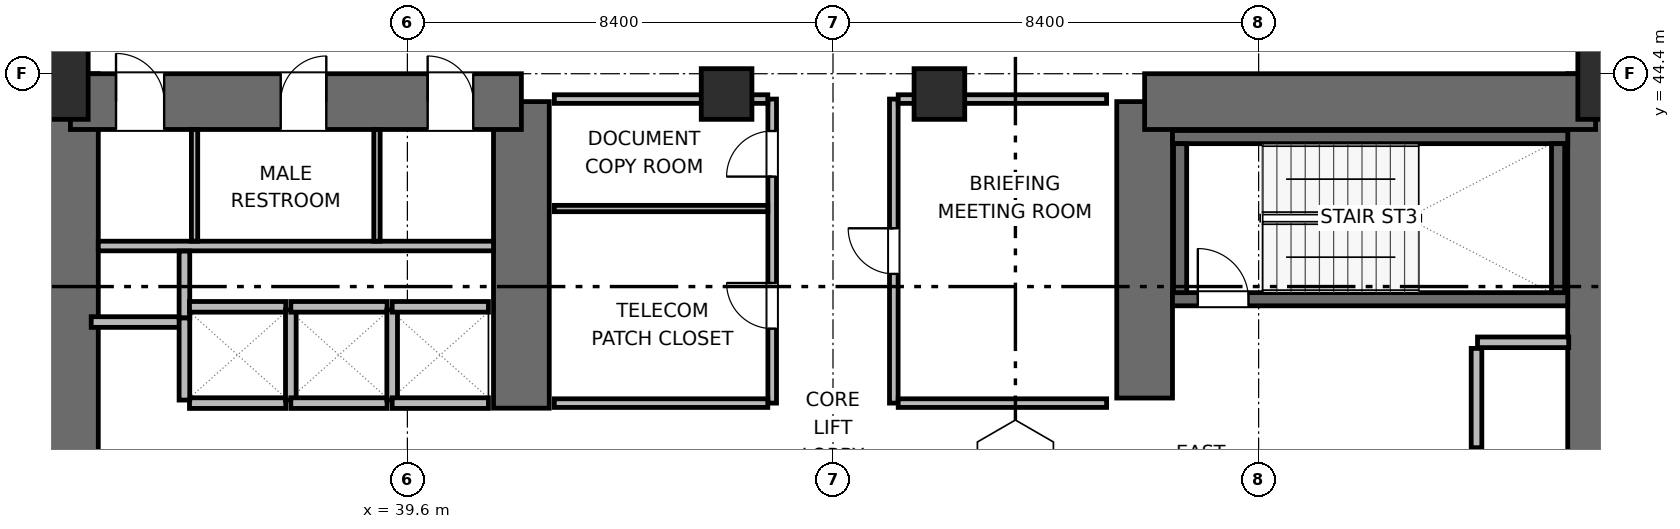
"""IFC4 building model, lengths in metres.
Left out: names, types, materials, properties, quantities, classifications, styles, units other than length and angle.
Written with IfcOpenShell. Run it as: python <this file> out.ifc"""

import sys

from ifc_helpers import new_model, si_unit, direction, frame, frame_2d, origin, origin_2d, place, context, subcontext, project, spatial, rectangle, extrude, element, fill, save


model = new_model("IFC4")
c1 = context("Model", 3, precision=1e-05, world=origin(), true_north=direction((0.0, 1.0)))
c2 = subcontext(c1, "Body", "Model", "MODEL_VIEW")
j1 = project(units=[si_unit("LENGTHUNIT", "METRE"), si_unit("PLANEANGLEUNIT", "RADIAN")], contexts=[c1])
p1 = place(None, origin())
s1 = spatial("IfcSite", under=j1, at=p1, CompositionType="ELEMENT")
p2 = place(p1, origin())
s2 = spatial("IfcBuilding", under=s1, at=p2, CompositionType="ELEMENT")
p3 = place(p2, frame((0.0, 0.0, 8.7)))
s3 = spatial("IfcBuildingStorey", under=s2, at=p3, CompositionType="ELEMENT", Elevation=8.7)
p4 = place(p3, frame((32.95, 27.6, 0.0), z_axis=(0.0, 0.0, 1.0), x_axis=(0.0, 1.0, 0.0)))
e1 = element("IfcWall", 1, at=p4, inside=s3, PredefinedType="SHEAR", context=c2, shape_type="SweptSolid", body=[
    extrude(rectangle(XDim=16.8, YDim=1.1, at=frame_2d((8.4, 0.0))), origin(), (0.0, 0.0, 1.0), 4.2),
])
p5 = place(p3, frame((41.85, 37.8, 0.0), z_axis=(0.0, 0.0, 1.0), x_axis=(0.0, 1.0, 0.0)))
e2 = element("IfcWall", 2, at=p5, inside=s3, PredefinedType="SHEAR", context=c2, shape_type="SweptSolid", body=[
    extrude(rectangle(XDim=6.05, YDim=1.1, at=frame_2d((3.025, 0.0))), origin(), (0.0, 0.0, 1.0), 4.2),
])
p6 = place(p3, frame((32.95, 43.85, 0.0), z_axis=(0.0, 0.0, 1.0), x_axis=(1.0, 0.0, 0.0)))
e3 = element("IfcWall", 3, at=p6, inside=s3, PredefinedType="SHEAR", context=c2, shape_type="SweptSolid", body=[
    extrude(rectangle(XDim=8.9, YDim=1.1, at=frame_2d((4.45, 0.0))), origin(), (0.0, 0.0, 1.0), 4.2),
])
p7 = place(p6, frame((0.9, 0.0, 0.0)))
e4 = element("IfcOpeningElement", 4, at=p7, cuts=e3, PredefinedType="OPENING", context=c2, shape_type="SweptSolid", body=[
    extrude(rectangle(XDim=0.95, YDim=2.04, at=frame_2d((0.475, 1.02))), frame((0.0, 0.56, 0.0), z_axis=(0.0, -1.0, 0.0), x_axis=(1.0, 0.0, 0.0)), (0.0, 0.0, 1.0), 1.12),
])
p8 = place(p6, frame((4.15, 0.0, 0.0)))
e5 = element("IfcOpeningElement", 5, at=p8, cuts=e3, PredefinedType="OPENING", context=c2, shape_type="SweptSolid", body=[
    extrude(rectangle(XDim=0.9, YDim=2.02, at=frame_2d((0.45, 1.01))), frame((0.0, 0.56, 0.0), z_axis=(0.0, -1.0, 0.0), x_axis=(1.0, 0.0, 0.0)), (0.0, 0.0, 1.0), 1.12),
])
p9 = place(p6, frame((7.05, 0.0, 0.0)))
e6 = element("IfcOpeningElement", 6, at=p9, cuts=e3, PredefinedType="OPENING", context=c2, shape_type="SweptSolid", body=[
    extrude(rectangle(XDim=0.9, YDim=2.02, at=frame_2d((0.45, 1.01))), frame((0.0, 0.56, 0.0), z_axis=(0.0, -1.0, 0.0), x_axis=(1.0, 0.0, 0.0)), (0.0, 0.0, 1.0), 1.12),
])
p10 = place(p3, frame((54.15, 38.0, 0.0), z_axis=(0.0, 0.0, 1.0), x_axis=(0.0, 1.0, 0.0)))
e7 = element("IfcWall", 7, at=p10, inside=s3, PredefinedType="SHEAR", context=c2, shape_type="SweptSolid", body=[
    extrude(rectangle(XDim=5.85, YDim=1.1, at=frame_2d((2.925, 0.0))), origin(), (0.0, 0.0, 1.0), 4.2),
])
p11 = place(p3, frame((63.05, 27.6, 0.0), z_axis=(0.0, 0.0, 1.0), x_axis=(0.0, 1.0, 0.0)))
e8 = element("IfcWall", 8, at=p11, inside=s3, PredefinedType="SHEAR", context=c2, shape_type="SweptSolid", body=[
    extrude(rectangle(XDim=16.8, YDim=1.1, at=frame_2d((8.4, 0.0))), origin(), (0.0, 0.0, 1.0), 4.2),
])
p12 = place(p3, frame((54.15, 43.85, 0.0), z_axis=(0.0, 0.0, 1.0), x_axis=(1.0, 0.0, 0.0)))
e9 = element("IfcWall", 9, at=p12, inside=s3, PredefinedType="SHEAR", context=c2, shape_type="SweptSolid", body=[
    extrude(rectangle(XDim=8.9, YDim=1.1, at=frame_2d((4.45, 0.0))), origin(), (0.0, 0.0, 1.0), 4.2),
])
p13 = place(p3, frame((54.7, 39.95, 0.0), z_axis=(0.0, 0.0, 1.0), x_axis=(1.0, 0.0, 0.0)))
e10 = element("IfcWall", 10, at=p13, inside=s3, PredefinedType="SHEAR", context=c2, shape_type="SweptSolid", body=[
    extrude(rectangle(XDim=7.8, YDim=0.26, at=frame_2d((3.9, 0.0))), origin(), (0.0, 0.0, 1.0), 4.2),
])
p14 = place(p13, frame((0.5, 0.0, 0.0)))
e11 = element("IfcOpeningElement", 11, at=p14, cuts=e10, PredefinedType="OPENING", context=c2, shape_type="SweptSolid", body=[
    extrude(rectangle(XDim=1.0, YDim=2.04, at=frame_2d((0.5, 1.02))), frame((0.0, 0.14, 0.0), z_axis=(0.0, -1.0, 0.0), x_axis=(1.0, 0.0, 0.0)), (0.0, 0.0, 1.0), 0.28),
])
p15 = place(p3, frame((54.7, 43.15, 0.0), z_axis=(0.0, 0.0, 1.0), x_axis=(1.0, 0.0, 0.0)))
e12 = element("IfcWall", 12, at=p15, inside=s3, PredefinedType="SHEAR", context=c2, shape_type="SweptSolid", body=[
    extrude(rectangle(XDim=7.8, YDim=0.26, at=frame_2d((3.9, 0.0))), origin(), (0.0, 0.0, 1.0), 4.2),
])
for number, where, z_axis, x_axis in (
    (13, (54.85, 40.08, 0.0), (0.0, 0.0, 1.0), (0.0, 1.0, 0.0)),
    (14, (62.31, 40.08, 0.0), (0.0, 0.0, 1.0), (0.0, 1.0, 0.0)),
):
    element("IfcWall", number, at=place(p3, frame(where, z_axis=z_axis, x_axis=x_axis)), inside=s3, PredefinedType="SHEAR", context=c2, shape_type="SweptSolid", body=[
        extrude(rectangle(XDim=2.94, YDim=0.26, at=frame_2d((1.47, 0.0))), origin(), (0.0, 0.0, 1.0), 4.2),
    ])
for number, where, z_axis, x_axis in (
    (15, (32.4, 44.4, 0.0), (0.0, 0.0, 1.0), (1.0, 0.0, 0.0)),
    (16, (63.6, 44.4, 0.0), (0.0, 0.0, 1.0), (1.0, 0.0, 0.0)),
):
    element("IfcColumn", number, at=place(p3, frame(where, z_axis=z_axis, x_axis=x_axis)), inside=s3, PredefinedType="COLUMN", context=c2, shape_type="SweptSolid", body=[
        extrude(rectangle(XDim=1.8, YDim=1.8, at=origin_2d()), origin(), (0.0, 0.0, 1.0), 4.2),
    ])
for number, where, z_axis, x_axis in (
    (17, (45.9, 44.0, 0.0), (0.0, 0.0, 1.0), (1.0, 0.0, 0.0)),
    (18, (50.1, 44.0, 0.0), (0.0, 0.0, 1.0), (1.0, 0.0, 0.0)),
):
    element("IfcColumn", number, at=place(p3, frame(where, z_axis=z_axis, x_axis=x_axis)), inside=s3, PredefinedType="COLUMN", context=c2, shape_type="SweptSolid", body=[
        extrude(rectangle(XDim=1.0, YDim=1.0, at=origin_2d()), origin(), (0.0, 0.0, 1.0), 4.2),
    ])
p16 = place(p3, frame((33.5, 41.0, 0.0), z_axis=(0.0, 0.0, 1.0), x_axis=(1.0, 0.0, 0.0)))
e19 = element("IfcWall", 19, at=p16, inside=s3, PredefinedType="PLUMBINGWALL", context=c2, shape_type="SweptSolid", body=[
    extrude(rectangle(XDim=7.8, YDim=0.19, at=frame_2d((3.9, 0.0))), origin(), (0.0, 0.0, 1.0), 3.88),
])
for number, where, z_axis, x_axis in (
    (20, (35.4, 41.095, 0.0), (0.0, 0.0, 1.0), (0.0, 1.0, 0.0)),
    (21, (39.0, 41.095, 0.0), (0.0, 0.0, 1.0), (0.0, 1.0, 0.0)),
):
    element("IfcWall", number, at=place(p3, frame(where, z_axis=z_axis, x_axis=x_axis)), inside=s3, PredefinedType="PARTITIONING", context=c2, shape_type="SweptSolid", body=[
        extrude(rectangle(XDim=2.205, YDim=0.125, at=frame_2d((1.103, 0.0))), origin(), (0.0, 0.0, 1.0), 3.88),
    ])
p17 = place(p3, frame((33.36, 39.5, 0.0), z_axis=(0.0, 0.0, 1.0), x_axis=(1.0, 0.0, 0.0)))
e22 = element("IfcWall", 22, at=p17, inside=s3, PredefinedType="PARTITIONING", context=c2, shape_type="SweptSolid", body=[
    extrude(rectangle(XDim=1.86, YDim=0.21, at=frame_2d((0.93, 0.0))), origin(), (0.0, 0.0, 1.0), 3.88),
])
p18 = place(p3, frame((35.2, 39.58, 0.0), z_axis=(0.0, 0.0, 1.0), x_axis=(0.0, 1.0, 0.0)))
e23 = element("IfcWall", 23, at=p18, inside=s3, PredefinedType="PARTITIONING", context=c2, shape_type="SweptSolid", body=[
    extrude(rectangle(XDim=1.32, YDim=0.21, at=frame_2d((0.66, 0.0))), origin(), (0.0, 0.0, 1.0), 3.88),
])
p19 = place(p3, frame((60.72, 39.1, 0.0), z_axis=(0.0, 0.0, 1.0), x_axis=(1.0, 0.0, 0.0)))
e24 = element("IfcWall", 24, at=p19, inside=s3, PredefinedType="PARTITIONING", context=c2, shape_type="SweptSolid", body=[
    extrude(rectangle(XDim=1.8, YDim=0.21, at=frame_2d((0.9, 0.0))), origin(), (0.0, 0.0, 1.0), 3.88),
])
p20 = place(p3, frame((60.7, 37.02, 0.0), z_axis=(0.0, 0.0, 1.0), x_axis=(0.0, 1.0, 0.0)))
e25 = element("IfcWall", 25, at=p20, inside=s3, PredefinedType="PARTITIONING", context=c2, shape_type="SweptSolid", body=[
    extrude(rectangle(XDim=1.96, YDim=0.21, at=frame_2d((0.98, 0.0))), origin(), (0.0, 0.0, 1.0), 3.88),
])
for number, where, z_axis, x_axis in (
    (26, (35.3, 37.9, 0.0), (0.0, 0.0, 1.0), (1.0, 0.0, 0.0)),
    (27, (35.3, 39.8, 0.0), (0.0, 0.0, 1.0), (1.0, 0.0, 0.0)),
):
    element("IfcWall", number, at=place(p3, frame(where, z_axis=z_axis, x_axis=x_axis)), inside=s3, PredefinedType="PARTITIONING", context=c2, shape_type="SweptSolid", body=[
        extrude(rectangle(XDim=1.9, YDim=0.21, at=frame_2d((0.95, 0.0))), origin(), (0.0, 0.0, 1.0), 3.88),
    ])
p21 = place(p3, frame((35.2, 37.96, 0.0), z_axis=(0.0, 0.0, 1.0), x_axis=(0.0, 1.0, 0.0)))
e28 = element("IfcWall", 28, at=p21, inside=s3, PredefinedType="PARTITIONING", context=c2, shape_type="SweptSolid", body=[
    extrude(rectangle(XDim=1.62, YDim=0.21, at=frame_2d((0.81, 0.0))), origin(), (0.0, 0.0, 1.0), 3.88),
])
p22 = place(p3, frame((37.3, 37.96, 0.0), z_axis=(0.0, 0.0, 1.0), x_axis=(0.0, 1.0, 0.0)))
e29 = element("IfcWall", 29, at=p22, inside=s3, PredefinedType="PARTITIONING", context=c2, shape_type="SweptSolid", body=[
    extrude(rectangle(XDim=1.78, YDim=0.21, at=frame_2d((0.89, 0.0))), origin(), (0.0, 0.0, 1.0), 3.88),
])
for number, where, z_axis, x_axis in (
    (30, (37.3, 37.9, 0.0), (0.0, 0.0, 1.0), (1.0, 0.0, 0.0)),
    (31, (37.3, 39.8, 0.0), (0.0, 0.0, 1.0), (1.0, 0.0, 0.0)),
):
    element("IfcWall", number, at=place(p3, frame(where, z_axis=z_axis, x_axis=x_axis)), inside=s3, PredefinedType="PARTITIONING", context=c2, shape_type="SweptSolid", body=[
        extrude(rectangle(XDim=1.9, YDim=0.21, at=frame_2d((0.95, 0.0))), origin(), (0.0, 0.0, 1.0), 3.88),
    ])
p23 = place(p3, frame((39.3, 37.96, 0.0), z_axis=(0.0, 0.0, 1.0), x_axis=(0.0, 1.0, 0.0)))
e32 = element("IfcWall", 32, at=p23, inside=s3, PredefinedType="PARTITIONING", context=c2, shape_type="SweptSolid", body=[
    extrude(rectangle(XDim=1.78, YDim=0.21, at=frame_2d((0.89, 0.0))), origin(), (0.0, 0.0, 1.0), 3.88),
])
for number, where, z_axis, x_axis in (
    (33, (39.3, 37.9, 0.0), (0.0, 0.0, 1.0), (1.0, 0.0, 0.0)),
    (34, (39.3, 39.8, 0.0), (0.0, 0.0, 1.0), (1.0, 0.0, 0.0)),
):
    element("IfcWall", number, at=place(p3, frame(where, z_axis=z_axis, x_axis=x_axis)), inside=s3, PredefinedType="PARTITIONING", context=c2, shape_type="SweptSolid", body=[
        extrude(rectangle(XDim=1.9, YDim=0.21, at=frame_2d((0.95, 0.0))), origin(), (0.0, 0.0, 1.0), 3.88),
    ])
p24 = place(p3, frame((46.8, 37.9, 0.0), z_axis=(0.0, 0.0, 1.0), x_axis=(0.0, 1.0, 0.0)))
e35 = element("IfcWall", 35, at=p24, inside=s3, PredefinedType="PARTITIONING", context=c2, shape_type="SweptSolid", body=[
    extrude(rectangle(XDim=6.0, YDim=0.17, at=frame_2d((3.0, 0.0))), origin(), (0.0, 0.0, 1.0), 3.88),
])
p25 = place(p24, frame((1.47, 0.0, 0.0)))
e36 = element("IfcOpeningElement", 36, at=p25, cuts=e35, PredefinedType="OPENING", context=c2, shape_type="SweptSolid", body=[
    extrude(rectangle(XDim=0.9, YDim=2.02, at=frame_2d((0.45, 1.01))), frame((0.0, 0.095, 0.0), z_axis=(0.0, -1.0, 0.0), x_axis=(1.0, 0.0, 0.0)), (0.0, 0.0, 1.0), 0.19),
])
p26 = place(p24, frame((4.47, 0.0, 0.0)))
e37 = element("IfcOpeningElement", 37, at=p26, cuts=e35, PredefinedType="OPENING", context=c2, shape_type="SweptSolid", body=[
    extrude(rectangle(XDim=0.9, YDim=2.02, at=frame_2d((0.45, 1.01))), frame((0.0, 0.095, 0.0), z_axis=(0.0, -1.0, 0.0), x_axis=(1.0, 0.0, 0.0)), (0.0, 0.0, 1.0), 0.19),
])
p27 = place(p3, frame((42.5, 37.9, 0.0), z_axis=(0.0, 0.0, 1.0), x_axis=(1.0, 0.0, 0.0)))
e38 = element("IfcWall", 38, at=p27, inside=s3, PredefinedType="PARTITIONING", context=c2, shape_type="SweptSolid", body=[
    extrude(rectangle(XDim=4.213, YDim=0.17, at=frame_2d((2.106, 0.0))), origin(), (0.0, 0.0, 1.0), 3.88),
])
p28 = place(p3, frame((42.5, 43.9, 0.0), z_axis=(0.0, 0.0, 1.0), x_axis=(1.0, 0.0, 0.0)))
e39 = element("IfcWall", 39, at=p28, inside=s3, PredefinedType="PARTITIONING", context=c2, shape_type="SweptSolid", body=[
    extrude(rectangle(XDim=4.213, YDim=0.17, at=frame_2d((2.106, 0.0))), origin(), (0.0, 0.0, 1.0), 2.765),
])
p29 = place(p3, frame((42.5, 41.74, 0.0), z_axis=(0.0, 0.0, 1.0), x_axis=(1.0, 0.0, 0.0)))
e40 = element("IfcWall", 40, at=p29, inside=s3, PredefinedType="PARTITIONING", context=c2, shape_type="SweptSolid", body=[
    extrude(rectangle(XDim=4.213, YDim=0.125, at=frame_2d((2.106, 0.0))), origin(), (0.0, 0.0, 1.0), 3.88),
])
p30 = place(p3, frame((49.2, 37.9, 0.0), z_axis=(0.0, 0.0, 1.0), x_axis=(0.0, 1.0, 0.0)))
e41 = element("IfcWall", 41, at=p30, inside=s3, PredefinedType="PARTITIONING", context=c2, shape_type="SweptSolid", body=[
    extrude(rectangle(XDim=6.0, YDim=0.17, at=frame_2d((3.0, 0.0))), origin(), (0.0, 0.0, 1.0), 3.88),
])
p31 = place(p30, frame((2.55, 0.0, 0.0)))
e42 = element("IfcOpeningElement", 42, at=p31, cuts=e41, PredefinedType="OPENING", context=c2, shape_type="SweptSolid", body=[
    extrude(rectangle(XDim=0.9, YDim=2.02, at=frame_2d((0.45, 1.01))), frame((0.0, 0.095, 0.0), z_axis=(0.0, -1.0, 0.0), x_axis=(1.0, 0.0, 0.0)), (0.0, 0.0, 1.0), 0.19),
])
p32 = place(p3, frame((49.287, 37.9, 0.0), z_axis=(0.0, 0.0, 1.0), x_axis=(1.0, 0.0, 0.0)))
e43 = element("IfcWall", 43, at=p32, inside=s3, PredefinedType="PARTITIONING", context=c2, shape_type="SweptSolid", body=[
    extrude(rectangle(XDim=4.113, YDim=0.17, at=frame_2d((2.056, 0.0))), origin(), (0.0, 0.0, 1.0), 3.88),
])
p33 = place(p3, frame((49.287, 43.9, 0.0), z_axis=(0.0, 0.0, 1.0), x_axis=(1.0, 0.0, 0.0)))
e44 = element("IfcWall", 44, at=p33, inside=s3, PredefinedType="PARTITIONING", context=c2, shape_type="SweptSolid", body=[
    extrude(rectangle(XDim=4.113, YDim=0.17, at=frame_2d((2.056, 0.0))), origin(), (0.0, 0.0, 1.0), 2.765),
])
p34 = place(p14, origin())
e45 = element("IfcDoor", 45, at=p34, inside=s3, OperationType="SINGLE_SWING_LEFT", PredefinedType="DOOR", context=c2, shape_type="SweptSolid", body=[
    extrude(rectangle(XDim=1.0, YDim=2.04, at=frame_2d((0.5, 1.02))), frame((0.0, 0.025, 0.0), z_axis=(0.0, -1.0, 0.0), x_axis=(1.0, 0.0, 0.0)), (0.0, 0.0, 1.0), 0.05),
])
fill(e11, e45)
p35 = place(p7, origin())
e46 = element("IfcDoor", 46, at=p35, inside=s3, OperationType="SINGLE_SWING_LEFT", PredefinedType="DOOR", context=c2, shape_type="SweptSolid", body=[
    extrude(rectangle(XDim=0.95, YDim=2.04, at=frame_2d((0.475, 1.02))), frame((0.0, 0.025, 0.0), z_axis=(0.0, -1.0, 0.0), x_axis=(1.0, 0.0, 0.0)), (0.0, 0.0, 1.0), 0.05),
])
fill(e4, e46)
p36 = place(p8, origin())
e47 = element("IfcDoor", 47, at=p36, inside=s3, OperationType="SINGLE_SWING_RIGHT", PredefinedType="DOOR", context=c2, shape_type="SweptSolid", body=[
    extrude(rectangle(XDim=0.9, YDim=2.02, at=frame_2d((0.45, 1.01))), frame((0.0, 0.025, 0.0), z_axis=(0.0, -1.0, 0.0), x_axis=(1.0, 0.0, 0.0)), (0.0, 0.0, 1.0), 0.05),
])
fill(e5, e47)
p37 = place(p9, origin())
e48 = element("IfcDoor", 48, at=p37, inside=s3, OperationType="SINGLE_SWING_LEFT", PredefinedType="DOOR", context=c2, shape_type="SweptSolid", body=[
    extrude(rectangle(XDim=0.9, YDim=2.02, at=frame_2d((0.45, 1.01))), frame((0.0, 0.025, 0.0), z_axis=(0.0, -1.0, 0.0), x_axis=(1.0, 0.0, 0.0)), (0.0, 0.0, 1.0), 0.05),
])
fill(e6, e48)
p38 = place(p25, origin())
e49 = element("IfcDoor", 49, at=p38, inside=s3, OperationType="SINGLE_SWING_RIGHT", PredefinedType="DOOR", context=c2, shape_type="SweptSolid", body=[
    extrude(rectangle(XDim=0.9, YDim=2.02, at=frame_2d((0.45, 1.01))), frame((0.0, 0.025, 0.0), z_axis=(0.0, -1.0, 0.0), x_axis=(1.0, 0.0, 0.0)), (0.0, 0.0, 1.0), 0.05),
])
fill(e36, e49)
p39 = place(p26, origin())
e50 = element("IfcDoor", 50, at=p39, inside=s3, OperationType="SINGLE_SWING_LEFT", PredefinedType="DOOR", context=c2, shape_type="SweptSolid", body=[
    extrude(rectangle(XDim=0.9, YDim=2.02, at=frame_2d((0.45, 1.01))), frame((0.0, 0.025, 0.0), z_axis=(0.0, -1.0, 0.0), x_axis=(1.0, 0.0, 0.0)), (0.0, 0.0, 1.0), 0.05),
])
fill(e37, e50)
p40 = place(p31, origin())
e51 = element("IfcDoor", 51, at=p40, inside=s3, OperationType="SINGLE_SWING_RIGHT", PredefinedType="DOOR", context=c2, shape_type="SweptSolid", body=[
    extrude(rectangle(XDim=0.9, YDim=2.02, at=frame_2d((0.45, 1.01))), frame((0.0, 0.025, 0.0), z_axis=(0.0, -1.0, 0.0), x_axis=(1.0, 0.0, 0.0)), (0.0, 0.0, 1.0), 0.05),
])
fill(e42, e51)
save(model, sys.argv[1])
